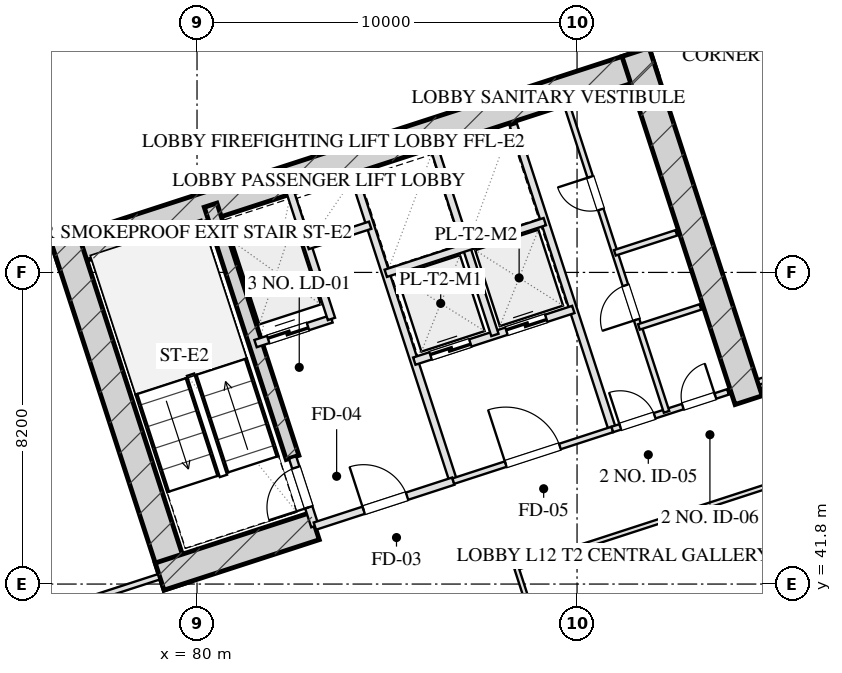
"""IFC4 building model, lengths in metres.
Left out: names, types, materials, properties, quantities, classifications, styles, units other than length and angle.
Written with IfcOpenShell. Run it as: python <this file> out.ifc"""

import sys

from ifc_helpers import new_model, si_unit, direction, frame, frame_2d, origin, place, context, subcontext, project, spatial, rectangle, extrude, element, fill, save


model = new_model("IFC4")
c1 = context("Model", 3, precision=1e-05, world=origin(), true_north=direction((0.0, 1.0)))
c2 = subcontext(c1, "Body", "Model", "MODEL_VIEW")
j1 = project(units=[si_unit("LENGTHUNIT", "METRE"), si_unit("PLANEANGLEUNIT", "RADIAN")], contexts=[c1])
p1 = place(None, origin())
s1 = spatial("IfcSite", under=j1, at=p1, CompositionType="ELEMENT")
p2 = place(p1, origin())
s2 = spatial("IfcBuilding", under=s1, at=p2, CompositionType="ELEMENT")
p3 = place(p2, frame((0.0, 0.0, 54.05)))
s3 = spatial("IfcBuildingStorey", under=s2, at=p3, CompositionType="ELEMENT", Elevation=54.05)
p4 = place(p3, frame((76.272, 50.443, 0.0), z_axis=(0.0, 0.0, 1.0), x_axis=(0.951056072937, 0.309018358888, 0.0)))
e1 = element("IfcWall", 1, at=p4, inside=s3, PredefinedType="SHEAR", context=c2, shape_type="SweptSolid", body=[
    extrude(rectangle(XDim=16.55, YDim=0.75, at=frame_2d((8.275, 0.0))), origin(), (0.0, 0.0, 1.0), 3.45),
])
for number, where, z_axis, x_axis in (
    (2, (79.489, 41.756, 0.0), (0.0, 0.0, 1.0), (-0.309, 0.951, 0.0)),
    (3, (94.515, 46.639, 0.0), (0.0, 0.0, 1.0), (-0.309, 0.951, 0.0)),
):
    element("IfcWall", number, at=place(p3, frame(where, z_axis=z_axis, x_axis=x_axis)), inside=s3, PredefinedType="SHEAR", context=c2, shape_type="SweptSolid", body=[
        extrude(rectangle(XDim=9.63, YDim=0.75, at=frame_2d((4.815, 0.0))), origin(), (0.0, 0.0, 1.0), 3.45),
    ])
p5 = place(p3, frame((82.514, 45.131, 0.0), z_axis=(0.0, 0.0, 1.0), x_axis=(-0.308988790936, 0.951065679686, 0.0)))
e4 = element("IfcWall", 4, at=p5, inside=s3, PredefinedType="SHEAR", context=c2, shape_type="SweptSolid", body=[
    extrude(rectangle(XDim=6.98, YDim=0.35, at=frame_2d((3.49, 0.0))), origin(), (0.0, 0.0, 1.0), 3.45),
])
p6 = place(p3, frame((79.016, 41.997, 0.0), z_axis=(0.0, 0.0, 1.0), x_axis=(0.95106038264, 0.309005094736, 0.0)))
e5 = element("IfcWall", 5, at=p6, inside=s3, PredefinedType="SHEAR", context=c2, shape_type="SweptSolid", body=[
    extrude(rectangle(XDim=4.295, YDim=0.75, at=frame_2d((2.147, 0.0))), origin(), (0.0, 0.0, 1.0), 3.45),
])
p7 = place(p3, frame((79.655, 4.352, 0.0), z_axis=(0.0, 0.0, 1.0), x_axis=(-0.309014526607, 0.951057318118, 0.0)))
e6 = element("IfcWall", 6, at=p7, inside=s3, PredefinedType="SOLIDWALL", context=c2, shape_type="SweptSolid", body=[
    extrude(rectangle(XDim=50.0, YDim=0.4, at=frame_2d((25.0, 0.0))), origin(), (0.0, 0.0, 1.0), 2.61),
])
p8 = place(p7, frame((17.35, 0.0, 0.75)))
e7 = element("IfcOpeningElement", 7, at=p8, cuts=e6, PredefinedType="OPENING", context=c2, shape_type="SweptSolid", body=[
    extrude(rectangle(XDim=2.5, YDim=1.46, at=frame_2d((1.25, 0.73))), frame((0.0, 0.21, 0.0), z_axis=(0.0, -1.0, 0.0), x_axis=(1.0, 0.0, 0.0)), (0.0, 0.0, 1.0), 0.42),
])
p9 = place(p7, frame((30.15, 0.0, 0.75)))
e8 = element("IfcOpeningElement", 8, at=p9, cuts=e6, PredefinedType="OPENING", context=c2, shape_type="SweptSolid", body=[
    extrude(rectangle(XDim=2.5, YDim=1.46, at=frame_2d((1.25, 0.73))), frame((0.0, 0.21, 0.0), z_axis=(0.0, -1.0, 0.0), x_axis=(1.0, 0.0, 0.0)), (0.0, 0.0, 1.0), 0.42),
])
p10 = place(p3, frame((66.002, 55.433, 0.0), z_axis=(0.0, 0.0, 1.0), x_axis=(0.951055939317, 0.309018770125, 0.0)))
e9 = element("IfcWall", 9, at=p10, inside=s3, PredefinedType="SOLIDWALL", context=c2, shape_type="SweptSolid", body=[
    extrude(rectangle(XDim=32.4, YDim=0.4, at=frame_2d((16.2, 0.0))), origin(), (0.0, 0.0, 1.0), 2.61),
])
p11 = place(p3, frame((83.101, 43.324, 0.0), z_axis=(0.0, 0.0, 1.0), x_axis=(-0.309048298632, 0.951046344356, 0.0)))
e10 = element("IfcWall", 10, at=p11, inside=s3, PredefinedType="PARTITIONING", context=c2, shape_type="SweptSolid", body=[
    extrude(rectangle(XDim=1.9, YDim=0.2, at=frame_2d((0.95, 0.0))), origin(), (0.0, 0.0, 1.0), 3.175),
])
p12 = place(p11, frame((0.52, 0.0, 0.0)))
e11 = element("IfcOpeningElement", 11, at=p12, cuts=e10, PredefinedType="OPENING", context=c2, shape_type="SweptSolid", body=[
    extrude(rectangle(XDim=1.1, YDim=2.05, at=frame_2d((0.55, 1.025))), frame((0.0, 0.11, 0.0), z_axis=(0.0, -1.0, 0.0), x_axis=(1.0, 0.0, 0.0)), (0.0, 0.0, 1.0), 0.22),
])
p13 = place(p3, frame((86.743, 44.508, 0.0), z_axis=(0.0, 0.0, 1.0), x_axis=(-0.309016001439, 0.951056838919, 0.0)))
e12 = element("IfcWall", 12, at=p13, inside=s3, PredefinedType="PARTITIONING", context=c2, shape_type="SweptSolid", body=[
    extrude(rectangle(XDim=8.43, YDim=0.2, at=frame_2d((4.215, 0.0))), origin(), (0.0, 0.0, 1.0), 3.175),
])
p14 = place(p3, frame((83.101, 43.324, 0.0), z_axis=(0.0, 0.0, 1.0), x_axis=(0.951052804469, 0.309028417967, 0.0)))
e13 = element("IfcWall", 13, at=p14, inside=s3, PredefinedType="PARTITIONING", context=c2, shape_type="SweptSolid", body=[
    extrude(rectangle(XDim=3.83, YDim=0.2, at=frame_2d((1.915, 0.0))), origin(), (0.0, 0.0, 1.0), 3.175),
])
p15 = place(p14, frame((1.35, 0.0, 0.0)))
e14 = element("IfcOpeningElement", 14, at=p15, cuts=e13, PredefinedType="OPENING", context=c2, shape_type="SweptSolid", body=[
    extrude(rectangle(XDim=1.2, YDim=2.05, at=frame_2d((0.6, 1.025))), frame((0.0, 0.11, 0.0), z_axis=(0.0, -1.0, 0.0), x_axis=(1.0, 0.0, 0.0)), (0.0, 0.0, 1.0), 0.22),
])
p16 = place(p3, frame((81.54, 48.127, 0.0), z_axis=(0.0, 0.0, 1.0), x_axis=(0.951062257173, 0.308999325213, 0.0)))
e15 = element("IfcWall", 15, at=p16, inside=s3, PredefinedType="PARTITIONING", context=c2, shape_type="SweptSolid", body=[
    extrude(rectangle(XDim=2.1, YDim=0.2, at=frame_2d((1.05, 0.0))), origin(), (0.0, 0.0, 1.0), 3.175),
])
p17 = place(p16, frame((0.35, 0.0, 0.0)))
e16 = element("IfcOpeningElement", 16, at=p17, cuts=e15, PredefinedType="OPENING", context=c2, shape_type="SweptSolid", body=[
    extrude(rectangle(XDim=1.1, YDim=2.05, at=frame_2d((0.55, 1.025))), frame((0.0, 0.11, 0.0), z_axis=(0.0, -1.0, 0.0), x_axis=(1.0, 0.0, 0.0)), (0.0, 0.0, 1.0), 0.22),
])
p18 = place(p3, frame((83.538, 48.776, 0.0), z_axis=(0.0, 0.0, 1.0), x_axis=(-0.3089935693, 0.951064127245, 0.0)))
e17 = element("IfcWall", 17, at=p18, inside=s3, PredefinedType="PARTITIONING", context=c2, shape_type="SweptSolid", body=[
    extrude(rectangle(XDim=3.7, YDim=0.2, at=frame_2d((1.85, 0.0))), origin(), (0.0, 0.0, 1.0), 3.175),
])
p19 = place(p3, frame((82.91, 50.707, 0.0), z_axis=(0.0, 0.0, 1.0), x_axis=(0.951041328149, 0.309063734775, 0.0)))
e18 = element("IfcWall", 18, at=p19, inside=s3, PredefinedType="PARTITIONING", context=c2, shape_type="SweptSolid", body=[
    extrude(rectangle(XDim=1.73, YDim=0.2, at=frame_2d((0.865, 0.0))), origin(), (0.0, 0.0, 1.0), 3.175),
])
p20 = place(p3, frame((90.928, 45.868, 0.0), z_axis=(0.0, 0.0, 1.0), x_axis=(-0.309042196757, 0.951048327176, 0.0)))
e19 = element("IfcWall", 19, at=p20, inside=s3, PredefinedType="PARTITIONING", context=c2, shape_type="SweptSolid", body=[
    extrude(rectangle(XDim=8.43, YDim=0.2, at=frame_2d((4.215, 0.0))), origin(), (0.0, 0.0, 1.0), 3.175),
])
p21 = place(p3, frame((86.743, 44.508, 0.0), z_axis=(0.0, 0.0, 1.0), x_axis=(0.951063829732, 0.308994485023, 0.0)))
e20 = element("IfcWall", 20, at=p21, inside=s3, PredefinedType="PARTITIONING", context=c2, shape_type="SweptSolid", body=[
    extrude(rectangle(XDim=4.4, YDim=0.15, at=frame_2d((2.2, 0.0))), origin(), (0.0, 0.0, 1.0), 3.175),
])
p22 = place(p21, frame((1.45, 0.0, 0.0)))
e21 = element("IfcOpeningElement", 21, at=p22, cuts=e20, PredefinedType="OPENING", context=c2, shape_type="SweptSolid", body=[
    extrude(rectangle(XDim=1.5, YDim=2.05, at=frame_2d((0.75, 1.025))), frame((0.0, 0.085, 0.0), z_axis=(0.0, -1.0, 0.0), x_axis=(1.0, 0.0, 0.0)), (0.0, 0.0, 1.0), 0.17),
])
p23 = place(p3, frame((85.718, 47.666, 0.0), z_axis=(0.0, 0.0, 1.0), x_axis=(0.951058531764, 0.30901079133, 0.0)))
e22 = element("IfcWall", 22, at=p23, inside=s3, PredefinedType="PARTITIONING", context=c2, shape_type="SweptSolid", body=[
    extrude(rectangle(XDim=4.4, YDim=0.2, at=frame_2d((2.2, 0.0))), origin(), (0.0, 0.0, 1.0), 3.175),
])
p24 = place(p23, frame((0.45, 0.0, 0.0)))
e23 = element("IfcOpeningElement", 23, at=p24, cuts=e22, PredefinedType="OPENING", context=c2, shape_type="SweptSolid", body=[
    extrude(rectangle(XDim=1.1, YDim=2.05, at=frame_2d((0.55, 1.025))), frame((0.0, 0.11, 0.0), z_axis=(0.0, -1.0, 0.0), x_axis=(1.0, 0.0, 0.0)), (0.0, 0.0, 1.0), 0.22),
])
p25 = place(p23, frame((2.55, 0.0, 0.0)))
e24 = element("IfcOpeningElement", 24, at=p25, cuts=e22, PredefinedType="OPENING", context=c2, shape_type="SweptSolid", body=[
    extrude(rectangle(XDim=1.1, YDim=2.05, at=frame_2d((0.55, 1.025))), frame((0.0, 0.11, 0.0), z_axis=(0.0, -1.0, 0.0), x_axis=(1.0, 0.0, 0.0)), (0.0, 0.0, 1.0), 0.22),
])
p26 = place(p3, frame((87.838, 48.354, 0.0), z_axis=(0.0, 0.0, 1.0), x_axis=(-0.3090093719, 0.951058992953, 0.0)))
e25 = element("IfcWall", 25, at=p26, inside=s3, PredefinedType="PARTITIONING", context=c2, shape_type="SweptSolid", body=[
    extrude(rectangle(XDim=5.11, YDim=0.2, at=frame_2d((2.555, 0.0))), origin(), (0.0, 0.0, 1.0), 3.175),
])
p27 = place(p3, frame((84.967, 49.977, 0.0), z_axis=(0.0, 0.0, 1.0), x_axis=(0.951063829732, 0.308994485023, 0.0)))
e26 = element("IfcWall", 26, at=p27, inside=s3, PredefinedType="PARTITIONING", context=c2, shape_type="SweptSolid", body=[
    extrude(rectangle(XDim=4.4, YDim=0.2, at=frame_2d((2.2, 0.0))), origin(), (0.0, 0.0, 1.0), 3.175),
])
p28 = place(p3, frame((90.928, 45.868, 0.0), z_axis=(0.0, 0.0, 1.0), x_axis=(0.951059297078, 0.309008435874, 0.0)))
e27 = element("IfcWall", 27, at=p28, inside=s3, PredefinedType="PARTITIONING", context=c2, shape_type="SweptSolid", body=[
    extrude(rectangle(XDim=3.2, YDim=0.15, at=frame_2d((1.6, 0.0))), origin(), (0.0, 0.0, 1.0), 3.175),
])
p29 = place(p28, frame((0.22, 0.0, 0.0)))
e28 = element("IfcOpeningElement", 28, at=p29, cuts=e27, PredefinedType="OPENING", context=c2, shape_type="SweptSolid", body=[
    extrude(rectangle(XDim=0.95, YDim=2.05, at=frame_2d((0.475, 1.025))), frame((0.0, 0.085, 0.0), z_axis=(0.0, -1.0, 0.0), x_axis=(1.0, 0.0, 0.0)), (0.0, 0.0, 1.0), 0.17),
])
p30 = place(p28, frame((1.95, 0.0, 0.0)))
e29 = element("IfcOpeningElement", 29, at=p30, cuts=e27, PredefinedType="OPENING", context=c2, shape_type="SweptSolid", body=[
    extrude(rectangle(XDim=0.9, YDim=2.05, at=frame_2d((0.45, 1.025))), frame((0.0, 0.085, 0.0), z_axis=(0.0, -1.0, 0.0), x_axis=(1.0, 0.0, 0.0)), (0.0, 0.0, 1.0), 0.17),
])
p31 = place(p3, frame((92.355, 46.331, 0.0), z_axis=(0.0, 0.0, 1.0), x_axis=(-0.309007490203, 0.951059604335, 0.0)))
e30 = element("IfcWall", 30, at=p31, inside=s3, PredefinedType="PARTITIONING", context=c2, shape_type="SweptSolid", body=[
    extrude(rectangle(XDim=8.43, YDim=0.15, at=frame_2d((4.215, 0.0))), origin(), (0.0, 0.0, 1.0), 3.175),
])
p32 = place(p31, frame((2.55, 0.0, 0.0)))
e31 = element("IfcOpeningElement", 31, at=p32, cuts=e30, PredefinedType="OPENING", context=c2, shape_type="SweptSolid", body=[
    extrude(rectangle(XDim=0.95, YDim=2.05, at=frame_2d((0.475, 1.025))), frame((0.0, 0.085, 0.0), z_axis=(0.0, -1.0, 0.0), x_axis=(1.0, 0.0, 0.0)), (0.0, 0.0, 1.0), 0.17),
])
p33 = place(p31, frame((5.6, 0.0, 0.0)))
e32 = element("IfcOpeningElement", 32, at=p33, cuts=e30, PredefinedType="OPENING", context=c2, shape_type="SweptSolid", body=[
    extrude(rectangle(XDim=0.9, YDim=2.05, at=frame_2d((0.45, 1.025))), frame((0.0, 0.085, 0.0), z_axis=(0.0, -1.0, 0.0), x_axis=(1.0, 0.0, 0.0)), (0.0, 0.0, 1.0), 0.17),
])
p34 = place(p3, frame((90.995, 50.516, 0.0), z_axis=(0.0, 0.0, 1.0), x_axis=(0.951040401051, 0.309066587596, 0.0)))
e33 = element("IfcWall", 33, at=p34, inside=s3, PredefinedType="PARTITIONING", context=c2, shape_type="SweptSolid", body=[
    extrude(rectangle(XDim=1.7, YDim=0.15, at=frame_2d((0.85, 0.0))), origin(), (0.0, 0.0, 1.0), 3.175),
])
p35 = place(p3, frame((91.628, 48.566, 0.0), z_axis=(0.0, 0.0, 1.0), x_axis=(0.951054116971, 0.309024378638, 0.0)))
e34 = element("IfcWall", 34, at=p35, inside=s3, PredefinedType="PARTITIONING", context=c2, shape_type="SweptSolid", body=[
    extrude(rectangle(XDim=1.7, YDim=0.15, at=frame_2d((0.85, 0.0))), origin(), (0.0, 0.0, 1.0), 3.175),
])
p36 = place(p3, frame((68.721, 38.652, 0.0), z_axis=(0.0, 0.0, 1.0), x_axis=(0.951056658866, 0.309016555588, 0.0)))
e35 = element("IfcWall", 35, at=p36, inside=s3, PredefinedType="PARTITIONING", context=c2, shape_type="SweptSolid", body=[
    extrude(rectangle(XDim=10.8, YDim=0.15, at=frame_2d((5.4, 0.0))), origin(), (0.0, 0.0, 1.0), 3.175),
])
p37 = place(p36, frame((4.536, 0.0, 0.0)))
e36 = element("IfcOpeningElement", 36, at=p37, cuts=e35, PredefinedType="OPENING", context=c2, shape_type="SweptSolid", body=[
    extrude(rectangle(XDim=0.85, YDim=2.05, at=frame_2d((0.425, 1.025))), frame((0.0, 0.085, 0.0), z_axis=(0.0, -1.0, 0.0), x_axis=(1.0, 0.0, 0.0)), (0.0, 0.0, 1.0), 0.17),
])
p38 = place(p3, frame((94.78, 47.119, 0.0), z_axis=(0.0, 0.0, 1.0), x_axis=(0.951054294345, 0.309023832749, 0.0)))
e37 = element("IfcWall", 37, at=p38, inside=s3, PredefinedType="PARTITIONING", context=c2, shape_type="SweptSolid", body=[
    extrude(rectangle(XDim=10.2, YDim=0.15, at=frame_2d((5.1, 0.0))), origin(), (0.0, 0.0, 1.0), 3.175),
])
p39 = place(p38, frame((4.284, 0.0, 0.0)))
e38 = element("IfcOpeningElement", 38, at=p39, cuts=e37, PredefinedType="OPENING", context=c2, shape_type="SweptSolid", body=[
    extrude(rectangle(XDim=1.05, YDim=2.05, at=frame_2d((0.525, 1.025))), frame((0.0, 0.085, 0.0), z_axis=(0.0, -1.0, 0.0), x_axis=(1.0, 0.0, 0.0)), (0.0, 0.0, 1.0), 0.17),
])
p40 = place(p3, frame((88.404, 42.229, 0.0), z_axis=(0.0, 0.0, 1.0), x_axis=(0.951054152931, 0.309024267966, 0.0)))
e39 = element("IfcWall", 39, at=p40, inside=s3, PredefinedType="PARTITIONING", context=c2, shape_type="SweptSolid", body=[
    extrude(rectangle(XDim=17.775, YDim=0.12, at=frame_2d((8.888, 0.0))), origin(), (0.0, 0.0, 1.0), 3.175),
])
p41 = place(p3, frame((93.546, 26.404, 0.0), z_axis=(0.0, 0.0, 1.0), x_axis=(-0.309022042254, 0.951054876125, 0.0)))
e40 = element("IfcWall", 40, at=p41, inside=s3, PredefinedType="PARTITIONING", context=c2, shape_type="SweptSolid", body=[
    extrude(rectangle(XDim=16.64, YDim=0.12, at=frame_2d((8.32, 0.0))), origin(), (0.0, 0.0, 1.0), 3.175),
])
p42 = place(p41, frame((1.16, 0.0, 0.0)))
e41 = element("IfcOpeningElement", 41, at=p42, cuts=e40, PredefinedType="OPENING", context=c2, shape_type="SweptSolid", body=[
    extrude(rectangle(XDim=1.0, YDim=2.05, at=frame_2d((0.5, 1.025))), frame((0.0, 0.07, 0.0), z_axis=(0.0, -1.0, 0.0), x_axis=(1.0, 0.0, 0.0)), (0.0, 0.0, 1.0), 0.14),
])
p43 = place(p41, frame((4.72, 0.0, 0.0)))
e42 = element("IfcOpeningElement", 42, at=p43, cuts=e40, PredefinedType="OPENING", context=c2, shape_type="SweptSolid", body=[
    extrude(rectangle(XDim=1.0, YDim=2.05, at=frame_2d((0.5, 1.025))), frame((0.0, 0.07, 0.0), z_axis=(0.0, -1.0, 0.0), x_axis=(1.0, 0.0, 0.0)), (0.0, 0.0, 1.0), 0.14),
])
p44 = place(p41, frame((7.549, 0.0, 0.0)))
e43 = element("IfcOpeningElement", 43, at=p44, cuts=e40, PredefinedType="OPENING", context=c2, shape_type="SweptSolid", body=[
    extrude(rectangle(XDim=1.0, YDim=2.05, at=frame_2d((0.5, 1.025))), frame((0.0, 0.07, 0.0), z_axis=(0.0, -1.0, 0.0), x_axis=(1.0, 0.0, 0.0)), (0.0, 0.0, 1.0), 0.14),
])
p45 = place(p41, frame((10.148, 0.0, 0.0)))
e44 = element("IfcOpeningElement", 44, at=p45, cuts=e40, PredefinedType="OPENING", context=c2, shape_type="SweptSolid", body=[
    extrude(rectangle(XDim=1.05, YDim=2.05, at=frame_2d((0.525, 1.025))), frame((0.0, 0.07, 0.0), z_axis=(0.0, -1.0, 0.0), x_axis=(1.0, 0.0, 0.0)), (0.0, 0.0, 1.0), 0.14),
])
p46 = place(p41, frame((14.48, 0.0, 0.0)))
e45 = element("IfcOpeningElement", 45, at=p46, cuts=e40, PredefinedType="OPENING", context=c2, shape_type="SweptSolid", body=[
    extrude(rectangle(XDim=1.0, YDim=2.05, at=frame_2d((0.5, 1.025))), frame((0.0, 0.07, 0.0), z_axis=(0.0, -1.0, 0.0), x_axis=(1.0, 0.0, 0.0)), (0.0, 0.0, 1.0), 0.14),
])
p47 = place(p3, frame((89.43, 39.072, 0.0), z_axis=(0.0, 0.0, 1.0), x_axis=(0.951058189574, 0.309011844505, 0.0)))
e46 = element("IfcWall", 46, at=p47, inside=s3, PredefinedType="PARTITIONING", context=c2, shape_type="SweptSolid", body=[
    extrude(rectangle(XDim=17.775, YDim=0.12, at=frame_2d((8.887, 0.0))), origin(), (0.0, 0.0, 1.0), 3.175),
])
p48 = place(p12, origin())
e47 = element("IfcDoor", 47, at=p48, inside=s3, OperationType="SINGLE_SWING_LEFT", PredefinedType="DOOR", context=c2, shape_type="SweptSolid", body=[
    extrude(rectangle(XDim=1.1, YDim=2.05, at=frame_2d((0.55, 1.025))), frame((0.0, 0.025, 0.0), z_axis=(0.0, -1.0, 0.0), x_axis=(1.0, 0.0, 0.0)), (0.0, 0.0, 1.0), 0.05),
])
fill(e11, e47)
p49 = place(p15, origin())
e48 = element("IfcDoor", 48, at=p49, inside=s3, OperationType="SINGLE_SWING_LEFT", PredefinedType="DOOR", context=c2, shape_type="SweptSolid", body=[
    extrude(rectangle(XDim=1.2, YDim=2.05, at=frame_2d((0.6, 1.025))), frame((0.0, 0.025, 0.0), z_axis=(0.0, -1.0, 0.0), x_axis=(1.0, 0.0, 0.0)), (0.0, 0.0, 1.0), 0.05),
])
fill(e14, e48)
p50 = place(p17, origin())
e49 = element("IfcDoor", 49, at=p50, inside=s3, OperationType="DOUBLE_DOOR_SLIDING", PredefinedType="DOOR", context=c2, shape_type="SweptSolid", body=[
    extrude(rectangle(XDim=1.1, YDim=2.05, at=frame_2d((0.55, 1.025))), frame((0.0, 0.025, 0.0), z_axis=(0.0, -1.0, 0.0), x_axis=(1.0, 0.0, 0.0)), (0.0, 0.0, 1.0), 0.05),
])
fill(e16, e49)
p51 = place(p22, origin())
e50 = element("IfcDoor", 50, at=p51, inside=s3, OperationType="SINGLE_SWING_LEFT", PredefinedType="DOOR", context=c2, shape_type="SweptSolid", body=[
    extrude(rectangle(XDim=1.5, YDim=2.05, at=frame_2d((0.75, 1.025))), frame((0.0, 0.025, 0.0), z_axis=(0.0, -1.0, 0.0), x_axis=(1.0, 0.0, 0.0)), (0.0, 0.0, 1.0), 0.05),
])
fill(e21, e50)
p52 = place(p24, origin())
e51 = element("IfcDoor", 51, at=p52, inside=s3, OperationType="DOUBLE_DOOR_SLIDING", PredefinedType="DOOR", context=c2, shape_type="SweptSolid", body=[
    extrude(rectangle(XDim=1.1, YDim=2.05, at=frame_2d((0.55, 1.025))), frame((0.0, 0.025, 0.0), z_axis=(0.0, -1.0, 0.0), x_axis=(1.0, 0.0, 0.0)), (0.0, 0.0, 1.0), 0.05),
])
fill(e23, e51)
p53 = place(p25, origin())
e52 = element("IfcDoor", 52, at=p53, inside=s3, OperationType="DOUBLE_DOOR_SLIDING", PredefinedType="DOOR", context=c2, shape_type="SweptSolid", body=[
    extrude(rectangle(XDim=1.1, YDim=2.05, at=frame_2d((0.55, 1.025))), frame((0.0, 0.025, 0.0), z_axis=(0.0, -1.0, 0.0), x_axis=(1.0, 0.0, 0.0)), (0.0, 0.0, 1.0), 0.05),
])
fill(e24, e52)
p54 = place(p29, origin())
e53 = element("IfcDoor", 53, at=p54, inside=s3, OperationType="SINGLE_SWING_LEFT", PredefinedType="DOOR", context=c2, shape_type="SweptSolid", body=[
    extrude(rectangle(XDim=0.95, YDim=2.05, at=frame_2d((0.475, 1.025))), frame((0.0, 0.025, 0.0), z_axis=(0.0, -1.0, 0.0), x_axis=(1.0, 0.0, 0.0)), (0.0, 0.0, 1.0), 0.05),
])
fill(e28, e53)
p55 = place(p30, origin())
e54 = element("IfcDoor", 54, at=p55, inside=s3, OperationType="SINGLE_SWING_RIGHT", PredefinedType="DOOR", context=c2, shape_type="SweptSolid", body=[
    extrude(rectangle(XDim=0.9, YDim=2.05, at=frame_2d((0.45, 1.025))), frame((0.0, 0.025, 0.0), z_axis=(0.0, -1.0, 0.0), x_axis=(1.0, 0.0, 0.0)), (0.0, 0.0, 1.0), 0.05),
])
fill(e29, e54)
p56 = place(p32, origin())
e55 = element("IfcDoor", 55, at=p56, inside=s3, OperationType="SINGLE_SWING_LEFT", PredefinedType="DOOR", context=c2, shape_type="SweptSolid", body=[
    extrude(rectangle(XDim=0.95, YDim=2.05, at=frame_2d((0.475, 1.025))), frame((0.0, 0.025, 0.0), z_axis=(0.0, -1.0, 0.0), x_axis=(1.0, 0.0, 0.0)), (0.0, 0.0, 1.0), 0.05),
])
fill(e31, e55)
p57 = place(p33, origin())
e56 = element("IfcDoor", 56, at=p57, inside=s3, OperationType="SINGLE_SWING_RIGHT", PredefinedType="DOOR", context=c2, shape_type="SweptSolid", body=[
    extrude(rectangle(XDim=0.9, YDim=2.05, at=frame_2d((0.45, 1.025))), frame((0.0, 0.025, 0.0), z_axis=(0.0, -1.0, 0.0), x_axis=(1.0, 0.0, 0.0)), (0.0, 0.0, 1.0), 0.05),
])
fill(e32, e56)
save(model, sys.argv[1])
